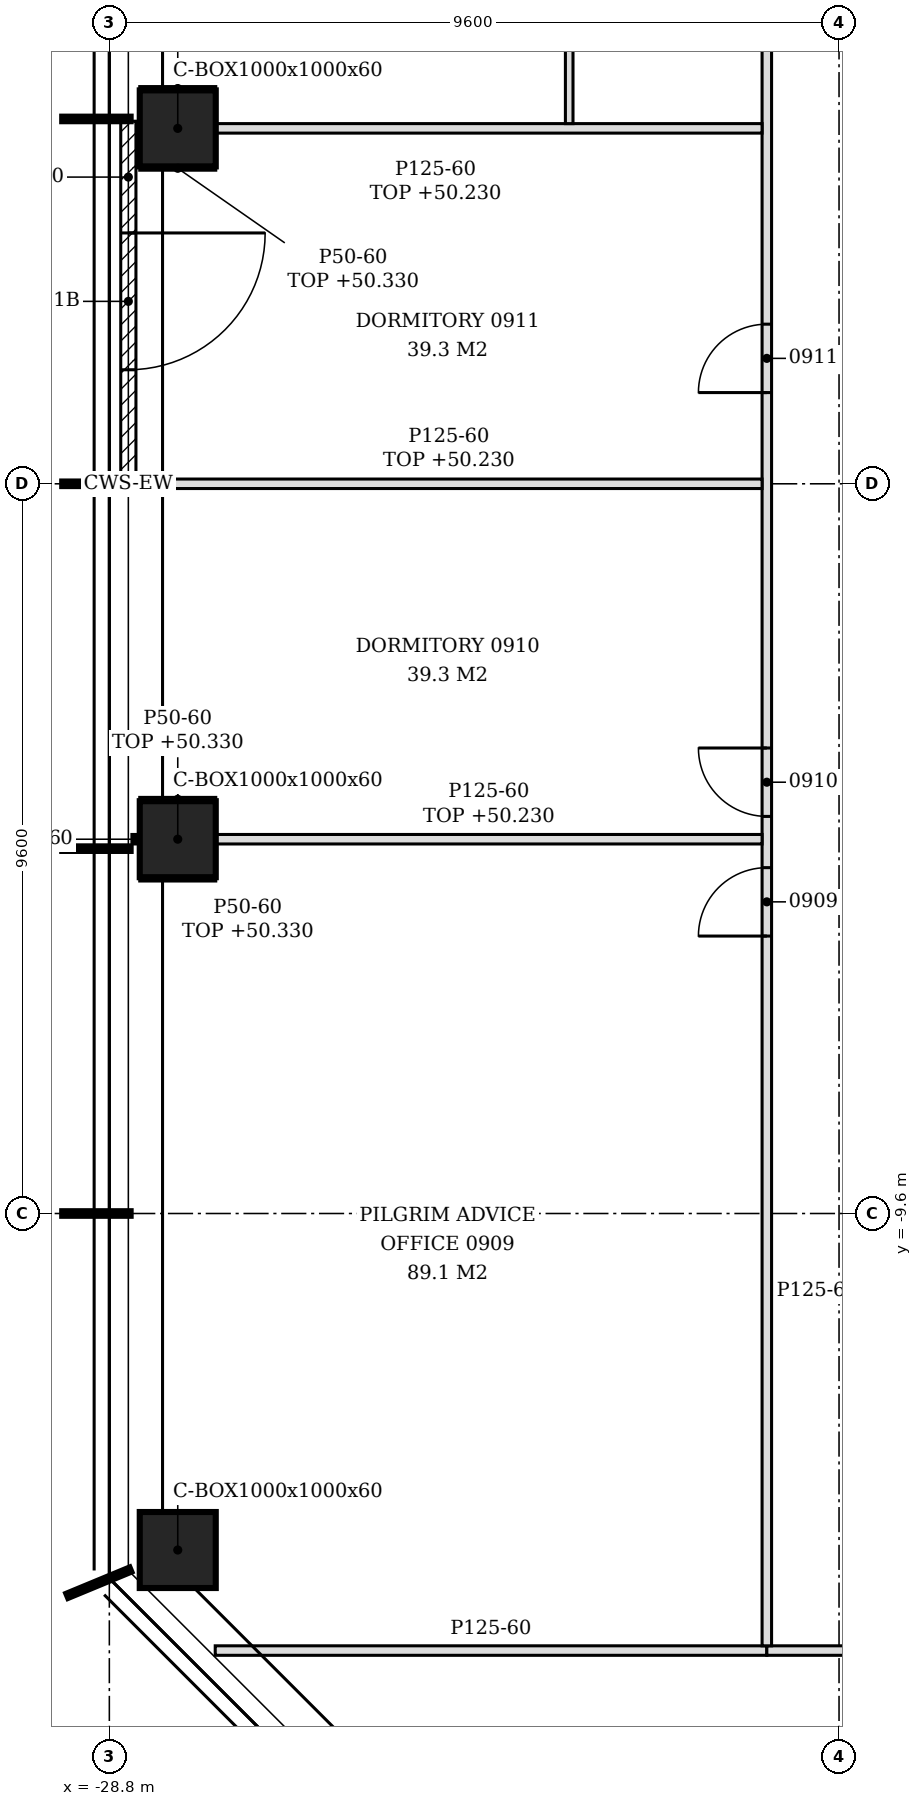
"""IFC4 building model, lengths in metres.
Left out: names, types, materials, properties, quantities, classifications, styles, units other than length and angle.
Written with IfcOpenShell. Run it as: python <this file> out.ifc"""

import sys

from ifc_helpers import new_model, si_unit, direction, frame, frame_2d, origin, origin_2d, place, context, subcontext, project, spatial, polyline, rectangle, hollow_rectangle, outline, extrude, element, fill, save


model = new_model("IFC4")
c1 = context("Model", 3, precision=1e-05, world=origin(), true_north=direction((0.0, 1.0)))
c2 = subcontext(c1, "Body", "Model", "MODEL_VIEW")
j1 = project(units=[si_unit("LENGTHUNIT", "METRE"), si_unit("PLANEANGLEUNIT", "RADIAN")], contexts=[c1])
p1 = place(None, origin())
s1 = spatial("IfcSite", under=j1, at=p1, CompositionType="ELEMENT")
p2 = place(p1, origin())
s2 = spatial("IfcBuilding", under=s1, at=p2, CompositionType="ELEMENT")
p3 = place(p2, frame((0.0, 0.0, 47.4)))
s3 = spatial("IfcBuildingStorey", under=s2, at=p3, CompositionType="ELEMENT", Elevation=47.4)
for number, where, z_axis, x_axis in (
    (1, (-27.9, 4.676, -0.15), (0.0, 0.0, 1.0), (1.0, 0.0, 0.0)),
    (2, (-27.9, -4.676, -0.15), (0.0, 0.0, 1.0), (1.0, 0.0, 0.0)),
    (3, (-27.9, -14.027, -0.15), (0.0, 0.0, 1.0), (1.0, 0.0, 0.0)),
):
    element("IfcColumn", number, at=place(p3, frame(where, z_axis=z_axis, x_axis=x_axis)), inside=s3, PredefinedType="COLUMN", context=c2, shape_type="SweptSolid", body=[
        extrude(hollow_rectangle(XDim=1.0, YDim=1.0, WallThickness=0.06, at=origin_2d()), origin(), (0.0, 0.0, 1.0), 3.6),
    ])
p4 = place(p3, frame((-28.55, 4.77, 0.0), z_axis=(0.0, 0.0, 1.0), x_axis=(0.0, -1.0, 0.0)))
e4 = element("IfcWall", 4, at=p4, inside=s3, PredefinedType="NOTDEFINED", context=c2, shape_type="SweptSolid", body=[
    extrude(rectangle(XDim=4.74, YDim=0.2, at=frame_2d((2.37, 0.0))), origin(), (0.0, 0.0, 1.0), 3.45),
])
p5 = place(p4, frame((1.47, 0.0, 0.0)))
e5 = element("IfcOpeningElement", 5, at=p5, cuts=e4, PredefinedType="OPENING", context=c2, shape_type="SweptSolid", body=[
    extrude(rectangle(XDim=1.8, YDim=2.4, at=frame_2d((0.9, 1.2))), frame((0.0, 0.11, 0.0), z_axis=(0.0, -1.0, 0.0), x_axis=(1.0, 0.0, 0.0)), (0.0, 0.0, 1.0), 0.22),
])
p6 = place(p3, frame((-27.407, -15.35, 0.0), z_axis=(0.0, 0.0, 1.0), x_axis=(1.0, 0.0, 0.0)))
e6 = element("IfcWall", 6, at=p6, inside=s3, PredefinedType="PARTITIONING", context=c2, shape_type="SweptSolid", body=[
    extrude(outline(polyline([(0.0, 0.0), (7.257, 0.0), (7.257, 3.45), (1.104, 3.45), (1.102, 2.93), (0.555, 2.93), (0.553, 3.45), (0.0, 3.45), (0.0, 0.0)])), frame((0.0, 0.062, 0.0), z_axis=(0.0, -1.0, 0.0), x_axis=(1.0, 0.0, 0.0)), (0.0, 0.0, 1.0), 0.125),
])
p7 = place(p3, frame((-20.15, -15.35, 0.0), z_axis=(0.0, 0.0, 1.0), x_axis=(1.0, 0.0, 0.0)))
e7 = element("IfcWall", 7, at=p7, inside=s3, PredefinedType="PARTITIONING", context=c2, shape_type="SweptSolid", body=[
    extrude(outline(polyline([(0.0, 0.0), (39.287, 0.0), (39.288, 2.73), (39.2, 2.73), (39.198, 3.45), (27.5, 3.45), (27.498, 2.73), (27.2, 2.73), (27.198, 3.45), (15.5, 3.45), (15.498, 2.73), (15.2, 2.73), (15.198, 3.45), (5.9, 3.45), (5.898, 2.93), (5.6, 2.93), (5.598, 3.45), (0.0, 3.45), (0.0, 0.0)])), frame((0.0, 0.062, 0.0), z_axis=(0.0, -1.0, 0.0), x_axis=(1.0, 0.0, 0.0)), (0.0, 0.0, 1.0), 0.125),
])
p8 = place(p7, frame((4.55, 0.0, 0.0)))
e8 = element("IfcOpeningElement", 8, at=p8, cuts=e7, PredefinedType="OPENING", context=c2, shape_type="SweptSolid", body=[
    extrude(rectangle(XDim=0.9, YDim=2.1, at=frame_2d((0.45, 1.05))), frame((0.0, 0.073, 0.0), z_axis=(0.0, -1.0, 0.0), x_axis=(1.0, 0.0, 0.0)), (0.0, 0.0, 1.0), 0.145),
])
p9 = place(p7, frame((7.136, 0.0, 0.0)))
e9 = element("IfcOpeningElement", 9, at=p9, cuts=e7, PredefinedType="OPENING", context=c2, shape_type="SweptSolid", body=[
    extrude(rectangle(XDim=0.9, YDim=2.1, at=frame_2d((0.45, 1.05))), frame((0.0, 0.073, 0.0), z_axis=(0.0, -1.0, 0.0), x_axis=(1.0, 0.0, 0.0)), (0.0, 0.0, 1.0), 0.145),
])
p10 = place(p7, frame((14.15, 0.0, 0.0)))
e10 = element("IfcOpeningElement", 10, at=p10, cuts=e7, PredefinedType="OPENING", context=c2, shape_type="SweptSolid", body=[
    extrude(rectangle(XDim=0.9, YDim=2.1, at=frame_2d((0.45, 1.05))), frame((0.0, 0.073, 0.0), z_axis=(0.0, -1.0, 0.0), x_axis=(1.0, 0.0, 0.0)), (0.0, 0.0, 1.0), 0.145),
])
p11 = place(p7, frame((16.55, 0.0, 0.0)))
e11 = element("IfcOpeningElement", 11, at=p11, cuts=e7, PredefinedType="OPENING", context=c2, shape_type="SweptSolid", body=[
    extrude(rectangle(XDim=0.9, YDim=2.1, at=frame_2d((0.45, 1.05))), frame((0.0, 0.073, 0.0), z_axis=(0.0, -1.0, 0.0), x_axis=(1.0, 0.0, 0.0)), (0.0, 0.0, 1.0), 0.145),
])
p12 = place(p7, frame((21.35, 0.0, 0.0)))
e12 = element("IfcOpeningElement", 12, at=p12, cuts=e7, PredefinedType="OPENING", context=c2, shape_type="SweptSolid", body=[
    extrude(rectangle(XDim=0.9, YDim=2.1, at=frame_2d((0.45, 1.05))), frame((0.0, 0.073, 0.0), z_axis=(0.0, -1.0, 0.0), x_axis=(1.0, 0.0, 0.0)), (0.0, 0.0, 1.0), 0.145),
])
p13 = place(p7, frame((28.364, 0.0, 0.0)))
e13 = element("IfcOpeningElement", 13, at=p13, cuts=e7, PredefinedType="OPENING", context=c2, shape_type="SweptSolid", body=[
    extrude(rectangle(XDim=0.9, YDim=2.1, at=frame_2d((0.45, 1.05))), frame((0.0, 0.073, 0.0), z_axis=(0.0, -1.0, 0.0), x_axis=(1.0, 0.0, 0.0)), (0.0, 0.0, 1.0), 0.145),
])
p14 = place(p7, frame((32.35, 0.0, 0.0)))
e14 = element("IfcOpeningElement", 14, at=p14, cuts=e7, PredefinedType="OPENING", context=c2, shape_type="SweptSolid", body=[
    extrude(rectangle(XDim=0.9, YDim=2.1, at=frame_2d((0.45, 1.05))), frame((0.0, 0.073, 0.0), z_axis=(0.0, -1.0, 0.0), x_axis=(1.0, 0.0, 0.0)), (0.0, 0.0, 1.0), 0.145),
])
p15 = place(p7, frame((37.35, 0.0, 0.0)))
e15 = element("IfcOpeningElement", 15, at=p15, cuts=e7, PredefinedType="OPENING", context=c2, shape_type="SweptSolid", body=[
    extrude(rectangle(XDim=0.9, YDim=2.1, at=frame_2d((0.45, 1.05))), frame((0.0, 0.073, 0.0), z_axis=(0.0, -1.0, 0.0), x_axis=(1.0, 0.0, 0.0)), (0.0, 0.0, 1.0), 0.145),
])
p16 = place(p3, frame((-20.15, -15.288, 0.0), z_axis=(0.0, 0.0, 1.0), x_axis=(0.0, 1.0, 0.0)))
e16 = element("IfcWall", 16, at=p16, inside=s3, PredefinedType="PARTITIONING", context=c2, shape_type="SweptSolid", body=[
    extrude(outline(polyline([(0.0, 0.0), (37.876, 0.0), (37.876, 3.45), (37.622, 3.45), (37.62, 2.63), (36.507, 2.63), (36.505, 3.45), (34.583, 3.45), (34.581, 2.98), (34.393, 2.98), (34.39, 3.45), (29.798, 3.45), (29.795, 2.83), (29.577, 2.83), (29.575, 3.45), (24.998, 3.45), (24.996, 2.83), (24.778, 2.83), (24.775, 3.45), (20.198, 3.45), (20.196, 2.83), (19.978, 2.83), (19.976, 3.45), (15.397, 3.45), (15.396, 2.83), (15.177, 2.83), (15.176, 3.45), (10.597, 3.45), (10.595, 2.83), (10.377, 2.83), (10.375, 3.45), (5.798, 3.45), (5.795, 2.83), (5.577, 2.83), (5.575, 3.45), (0.998, 3.45), (0.996, 2.83), (0.778, 2.83), (0.775, 3.45), (0.0, 3.45), (0.0, 0.0)])), frame((0.0, 0.062, 0.0), z_axis=(0.0, -1.0, 0.0), x_axis=(1.0, 0.0, 0.0)), (0.0, 0.0, 1.0), 0.125),
])
p17 = place(p16, frame((9.337, 0.0, 0.0)))
e17 = element("IfcOpeningElement", 17, at=p17, cuts=e16, PredefinedType="OPENING", context=c2, shape_type="SweptSolid", body=[
    extrude(rectangle(XDim=0.9, YDim=2.1, at=frame_2d((0.45, 1.05))), frame((0.0, 0.073, 0.0), z_axis=(0.0, -1.0, 0.0), x_axis=(1.0, 0.0, 0.0)), (0.0, 0.0, 1.0), 0.145),
])
p18 = place(p16, frame((10.912, 0.0, 0.0)))
e18 = element("IfcOpeningElement", 18, at=p18, cuts=e16, PredefinedType="OPENING", context=c2, shape_type="SweptSolid", body=[
    extrude(rectangle(XDim=0.9, YDim=2.1, at=frame_2d((0.45, 1.05))), frame((0.0, 0.073, 0.0), z_axis=(0.0, -1.0, 0.0), x_axis=(1.0, 0.0, 0.0)), (0.0, 0.0, 1.0), 0.145),
])
p19 = place(p16, frame((16.488, 0.0, 0.0)))
e19 = element("IfcOpeningElement", 19, at=p19, cuts=e16, PredefinedType="OPENING", context=c2, shape_type="SweptSolid", body=[
    extrude(rectangle(XDim=0.9, YDim=2.1, at=frame_2d((0.45, 1.05))), frame((0.0, 0.073, 0.0), z_axis=(0.0, -1.0, 0.0), x_axis=(1.0, 0.0, 0.0)), (0.0, 0.0, 1.0), 0.145),
])
p20 = place(p16, frame((23.664, 0.0, 0.0)))
e20 = element("IfcOpeningElement", 20, at=p20, cuts=e16, PredefinedType="OPENING", context=c2, shape_type="SweptSolid", body=[
    extrude(rectangle(XDim=0.9, YDim=2.1, at=frame_2d((0.45, 1.05))), frame((0.0, 0.073, 0.0), z_axis=(0.0, -1.0, 0.0), x_axis=(1.0, 0.0, 0.0)), (0.0, 0.0, 1.0), 0.145),
])
p21 = place(p16, frame((26.387, 0.0, 0.0)))
e21 = element("IfcOpeningElement", 21, at=p21, cuts=e16, PredefinedType="OPENING", context=c2, shape_type="SweptSolid", body=[
    extrude(rectangle(XDim=0.9, YDim=2.1, at=frame_2d((0.45, 1.05))), frame((0.0, 0.073, 0.0), z_axis=(0.0, -1.0, 0.0), x_axis=(1.0, 0.0, 0.0)), (0.0, 0.0, 1.0), 0.145),
])
p22 = place(p16, frame((29.615, 0.0, 0.0)))
e22 = element("IfcOpeningElement", 22, at=p22, cuts=e16, PredefinedType="OPENING", context=c2, shape_type="SweptSolid", body=[
    extrude(rectangle(XDim=0.9, YDim=2.1, at=frame_2d((0.45, 1.05))), frame((0.0, 0.073, 0.0), z_axis=(0.0, -1.0, 0.0), x_axis=(1.0, 0.0, 0.0)), (0.0, 0.0, 1.0), 0.145),
])
p23 = place(p3, frame((-28.503, -4.676, 0.0), z_axis=(0.0, 0.0, 1.0), x_axis=(1.0, 0.0, 0.0)))
e23 = element("IfcWall", 23, at=p23, inside=s3, PredefinedType="PARTITIONING", context=c2, shape_type="SweptSolid", body=[
    extrude(rectangle(XDim=0.103, YDim=0.125, at=frame_2d((0.052, 0.0))), origin(), (0.0, 0.0, 1.0), 3.45),
])
p24 = place(p3, frame((-27.4, -4.676, 0.0), z_axis=(0.0, 0.0, 1.0), x_axis=(1.0, 0.0, 0.0)))
e24 = element("IfcWall", 24, at=p24, inside=s3, PredefinedType="PARTITIONING", context=c2, shape_type="SweptSolid", body=[
    extrude(rectangle(XDim=7.188, YDim=0.125, at=frame_2d((3.594, 0.0))), origin(), (0.0, 0.0, 1.0), 2.83),
])
p25 = place(p3, frame((-28.45, 0.0, 0.0), z_axis=(0.0, 0.0, 1.0), x_axis=(1.0, 0.0, 0.0)))
e25 = element("IfcWall", 25, at=p25, inside=s3, PredefinedType="PARTITIONING", context=c2, shape_type="SweptSolid", body=[
    extrude(rectangle(XDim=8.238, YDim=0.125, at=frame_2d((4.119, 0.0))), origin(), (0.0, 0.0, 1.0), 2.83),
])
p26 = place(p3, frame((-27.4, 4.676, 0.0), z_axis=(0.0, 0.0, 1.0), x_axis=(1.0, 0.0, 0.0)))
e26 = element("IfcWall", 26, at=p26, inside=s3, PredefinedType="PARTITIONING", context=c2, shape_type="SweptSolid", body=[
    extrude(rectangle(XDim=7.188, YDim=0.125, at=frame_2d((3.594, 0.0))), origin(), (0.0, 0.0, 1.0), 2.83),
])
p27 = place(p3, frame((-22.75, 4.739, 0.0), z_axis=(0.0, 0.0, 1.0), x_axis=(0.0, 1.0, 0.0)))
e27 = element("IfcWall", 27, at=p27, inside=s3, PredefinedType="PARTITIONING", context=c2, shape_type="SweptSolid", body=[
    extrude(outline(polyline([(0.0, 0.0), (2.287, 0.0), (2.288, 3.45), (0.171, 3.45), (0.169, 2.83), (0.0, 2.83), (0.0, 0.0)])), frame((0.0, 0.05, 0.0), z_axis=(0.0, -1.0, 0.0), x_axis=(1.0, 0.0, 0.0)), (0.0, 0.0, 1.0), 0.1),
])
for number, where, z_axis, x_axis in (
    (28, (-28.4, -4.151, 0.0), (0.0, 0.0, 1.0), (1.0, 0.0, 0.0)),
    (29, (-28.4, -5.201, 0.0), (0.0, 0.0, 1.0), (1.0, 0.0, 0.0)),
    (30, (-28.4, 5.201, 0.0), (0.0, 0.0, 1.0), (1.0, 0.0, 0.0)),
    (31, (-28.4, 4.151, 0.0), (0.0, 0.0, 1.0), (1.0, 0.0, 0.0)),
):
    element("IfcWall", number, at=place(p3, frame(where, z_axis=z_axis, x_axis=x_axis)), inside=s3, PredefinedType="PARTITIONING", context=c2, shape_type="SweptSolid", body=[
        extrude(rectangle(XDim=1.0, YDim=0.05, at=frame_2d((0.5, 0.0))), origin(), (0.0, 0.0, 1.0), 2.93),
    ])
p28 = place(p5, origin())
e32 = element("IfcDoor", 32, at=p28, inside=s3, OperationType="SINGLE_SWING_LEFT", PredefinedType="DOOR", context=c2, shape_type="SweptSolid", body=[
    extrude(rectangle(XDim=1.8, YDim=2.4, at=frame_2d((0.9, 1.2))), frame((0.0, 0.025, 0.0), z_axis=(0.0, -1.0, 0.0), x_axis=(1.0, 0.0, 0.0)), (0.0, 0.0, 1.0), 0.05),
])
fill(e5, e32)
p29 = place(p17, origin())
e33 = element("IfcDoor", 33, at=p29, inside=s3, OperationType="SINGLE_SWING_LEFT", PredefinedType="DOOR", context=c2, shape_type="SweptSolid", body=[
    extrude(rectangle(XDim=0.9, YDim=2.1, at=frame_2d((0.45, 1.05))), frame((0.0, 0.025, 0.0), z_axis=(0.0, -1.0, 0.0), x_axis=(1.0, 0.0, 0.0)), (0.0, 0.0, 1.0), 0.05),
])
fill(e17, e33)
p30 = place(p18, origin())
e34 = element("IfcDoor", 34, at=p30, inside=s3, OperationType="SINGLE_SWING_RIGHT", PredefinedType="DOOR", context=c2, shape_type="SweptSolid", body=[
    extrude(rectangle(XDim=0.9, YDim=2.1, at=frame_2d((0.45, 1.05))), frame((0.0, 0.025, 0.0), z_axis=(0.0, -1.0, 0.0), x_axis=(1.0, 0.0, 0.0)), (0.0, 0.0, 1.0), 0.05),
])
fill(e18, e34)
p31 = place(p19, origin())
e35 = element("IfcDoor", 35, at=p31, inside=s3, OperationType="SINGLE_SWING_LEFT", PredefinedType="DOOR", context=c2, shape_type="SweptSolid", body=[
    extrude(rectangle(XDim=0.9, YDim=2.1, at=frame_2d((0.45, 1.05))), frame((0.0, 0.025, 0.0), z_axis=(0.0, -1.0, 0.0), x_axis=(1.0, 0.0, 0.0)), (0.0, 0.0, 1.0), 0.05),
])
fill(e19, e35)
save(model, sys.argv[1])
